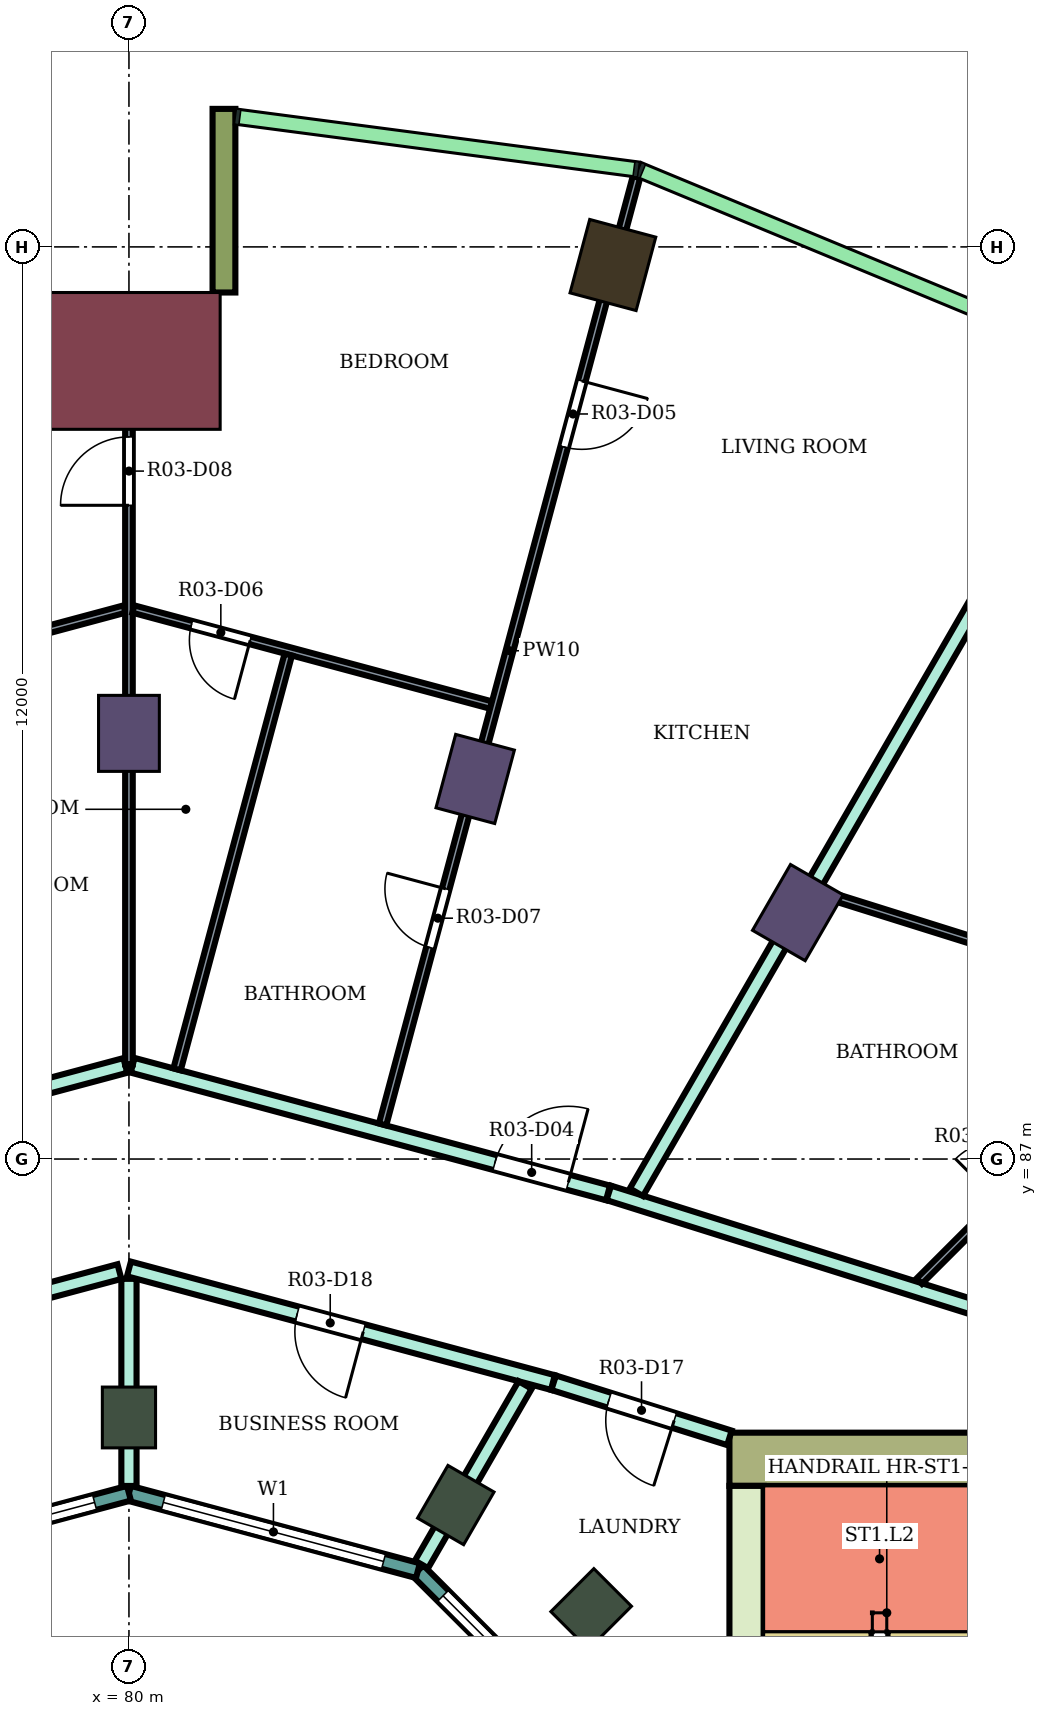
"""IFC4 building model, lengths in metres.
Left out: names, types, materials, properties, quantities, classifications, styles, units other than length and angle.
Written with IfcOpenShell. Run it as: python <this file> out.ifc"""

import sys

from ifc_helpers import new_model, si_unit, direction, frame, frame_2d, origin, origin_2d, place, context, subcontext, project, spatial, rectangle, extrude, element, fill, save


model = new_model("IFC4")
c1 = context("Model", 3, precision=1e-05, world=origin(), true_north=direction((0.0, 1.0)))
c2 = subcontext(c1, "Body", "Model", "MODEL_VIEW")
j1 = project(units=[si_unit("LENGTHUNIT", "METRE"), si_unit("PLANEANGLEUNIT", "RADIAN")], contexts=[c1])
p1 = place(None, origin())
s1 = spatial("IfcSite", under=j1, at=p1, CompositionType="ELEMENT")
p2 = place(p1, origin())
s2 = spatial("IfcBuilding", under=s1, at=p2, CompositionType="ELEMENT")
p3 = place(p2, frame((0.0, 0.0, 186.4)))
s3 = spatial("IfcBuildingStorey", under=s2, at=p3, CompositionType="ELEMENT", Elevation=186.4)
p4 = place(p3, frame((86.367, 98.762, 0.0), z_axis=(0.0, 0.0, 1.0), x_axis=(0.258819045103, 0.965925826289, 0.0)))
e1 = element("IfcColumn", 1, at=p4, inside=s3, PredefinedType="COLUMN", context=c2, shape_type="SweptSolid", body=[
    extrude(rectangle(XDim=1.0, YDim=0.9, at=origin_2d()), origin(), (0.0, 0.0, 1.0), 4.1),
])
for number, where, z_axis, x_axis in (
    (2, (88.8, 90.242, 0.0), (0.0, 0.0, 1.0), (0.5, 0.866, 0.0)),
    (3, (84.555, 92.0, 0.0), (0.0, 0.0, 1.0), (0.259, 0.966, 0.0)),
    (4, (80.0, 92.6, 0.0), (0.0, 0.0, 1.0), (0.0, 1.0, 0.0)),
):
    element("IfcColumn", number, at=place(p3, frame(where, z_axis=z_axis, x_axis=x_axis)), inside=s3, PredefinedType="COLUMN", context=c2, shape_type="SweptSolid", body=[
        extrude(rectangle(XDim=1.0, YDim=0.8, at=origin_2d()), origin(), (0.0, 0.0, 1.0), 4.1),
    ])
for number, where, z_axis, x_axis in (
    (5, (86.081, 81.081, 0.0), (0.0, 0.0, 1.0), (0.707, 0.707, 0.0)),
    (6, (84.3, 82.448, 0.0), (0.0, 0.0, 1.0), (0.5, 0.866, 0.0)),
    (7, (80.0, 83.6, 0.0), (0.0, 0.0, 1.0), (0.0, 1.0, 0.0)),
):
    element("IfcColumn", number, at=place(p3, frame(where, z_axis=z_axis, x_axis=x_axis)), inside=s3, PredefinedType="COLUMN", context=c2, shape_type="SweptSolid", body=[
        extrude(rectangle(XDim=0.8, YDim=0.7, at=origin_2d()), origin(), (0.0, 0.0, 1.0), 4.1),
    ])
p5 = place(p3, frame((80.0, 97.5, 0.0), z_axis=(0.0, 0.0, 1.0), x_axis=(0.0, 1.0, 0.0)))
e8 = element("IfcColumn", 8, at=p5, inside=s3, PredefinedType="COLUMN", context=c2, shape_type="SweptSolid", body=[
    extrude(rectangle(XDim=1.8, YDim=2.4, at=origin_2d()), origin(), (0.0, 0.0, 1.0), 4.1),
])
p6 = place(p3, frame((87.9, 83.05, 0.0), z_axis=(0.0, 0.0, 1.0), x_axis=(1.0, 0.0, 0.0)))
e9 = element("IfcWall", 9, at=p6, inside=s3, PredefinedType="SHEAR", context=c2, shape_type="SweptSolid", body=[
    extrude(rectangle(XDim=14.8, YDim=0.7, at=frame_2d((7.4, 0.0))), origin(), (0.0, 0.0, 1.0), 3.78),
])
p7 = place(p6, frame((4.2, 0.0, 0.0)))
e10 = element("IfcOpeningElement", 10, at=p7, cuts=e9, PredefinedType="OPENING", context=c2, shape_type="SweptSolid", body=[
    extrude(rectangle(XDim=2.4, YDim=2.4, at=frame_2d((1.2, 1.2))), frame((0.0, 0.36, 0.0), z_axis=(0.0, -1.0, 0.0), x_axis=(1.0, 0.0, 0.0)), (0.0, 0.0, 1.0), 0.72),
])
p8 = place(p3, frame((88.125, 75.0, 0.0), z_axis=(0.0, 0.0, 1.0), x_axis=(0.0, 1.0, 0.0)))
e11 = element("IfcWall", 11, at=p8, inside=s3, PredefinedType="SHEAR", context=c2, shape_type="SweptSolid", body=[
    extrude(rectangle(XDim=7.7, YDim=0.45, at=frame_2d((3.85, 0.0))), origin(), (0.0, 0.0, 1.0), 3.78),
])
p9 = place(p3, frame((81.25, 98.4, 0.0), z_axis=(0.0, 0.0, 1.0), x_axis=(0.0, 1.0, 0.0)))
e12 = element("IfcWall", 12, at=p9, inside=s3, PredefinedType="NOTDEFINED", context=c2, shape_type="SweptSolid", body=[
    extrude(rectangle(XDim=2.416, YDim=0.3, at=frame_2d((1.208, 0.0))), origin(), (0.0, 0.0, 1.0), 4.1),
])
p10 = place(p3, frame((86.585, 78.802, 0.0), z_axis=(0.0, 0.0, 1.0), x_axis=(-0.707106781187, 0.707106781187, 0.0)))
e13 = element("IfcWall", 13, at=p10, inside=s3, PredefinedType="NOTDEFINED", context=c2, shape_type="SweptSolid", body=[
    extrude(rectangle(XDim=3.936, YDim=0.2, at=frame_2d((1.968, 0.0))), origin(), (0.0, 0.0, 1.0), 4.1),
])
p11 = place(p10, frame((0.468, 0.0, 0.9)))
e14 = element("IfcOpeningElement", 14, at=p11, cuts=e13, PredefinedType="OPENING", context=c2, shape_type="SweptSolid", body=[
    extrude(rectangle(XDim=3.0, YDim=2.3, at=frame_2d((1.5, 1.15))), frame((0.0, 0.11, 0.0), z_axis=(0.0, -1.0, 0.0), x_axis=(1.0, 0.0, 0.0)), (0.0, 0.0, 1.0), 0.22),
])
p12 = place(p3, frame((83.802, 81.585, 0.0), z_axis=(0.0, 0.0, 1.0), x_axis=(-0.965933654434, 0.258789828301, 0.0)))
e15 = element("IfcWall", 15, at=p12, inside=s3, PredefinedType="NOTDEFINED", context=c2, shape_type="SweptSolid", body=[
    extrude(rectangle(XDim=3.936, YDim=0.2, at=frame_2d((1.968, 0.0))), origin(), (0.0, 0.0, 1.0), 4.1),
])
p13 = place(p12, frame((0.468, 0.0, 0.9)))
e16 = element("IfcOpeningElement", 16, at=p13, cuts=e15, PredefinedType="OPENING", context=c2, shape_type="SweptSolid", body=[
    extrude(rectangle(XDim=3.0, YDim=2.3, at=frame_2d((1.5, 1.15))), frame((0.0, 0.11, 0.0), z_axis=(0.0, -1.0, 0.0), x_axis=(1.0, 0.0, 0.0)), (0.0, 0.0, 1.0), 0.22),
])
p14 = place(p3, frame((80.0, 82.604, 0.0), z_axis=(0.0, 0.0, 1.0), x_axis=(-0.965933654434, -0.258789828301, 0.0)))
e17 = element("IfcWall", 17, at=p14, inside=s3, PredefinedType="NOTDEFINED", context=c2, shape_type="SweptSolid", body=[
    extrude(rectangle(XDim=3.936, YDim=0.2, at=frame_2d((1.968, 0.0))), origin(), (0.0, 0.0, 1.0), 4.1),
])
p15 = place(p14, frame((0.468, 0.0, 0.9)))
e18 = element("IfcOpeningElement", 18, at=p15, cuts=e17, PredefinedType="OPENING", context=c2, shape_type="SweptSolid", body=[
    extrude(rectangle(XDim=3.0, YDim=2.3, at=frame_2d((1.5, 1.15))), frame((0.0, 0.11, 0.0), z_axis=(0.0, -1.0, 0.0), x_axis=(1.0, 0.0, 0.0)), (0.0, 0.0, 1.0), 0.22),
])
p16 = place(p3, frame((73.687, 86.554, 0.0), z_axis=(0.0, 0.0, 1.0), x_axis=(0.965992724769, 0.258569247387, 0.0)))
e19 = element("IfcWall", 19, at=p16, inside=s3, PredefinedType="PARTITIONING", context=c2, shape_type="SweptSolid", body=[
    extrude(rectangle(XDim=6.486, YDim=0.2, at=frame_2d((3.243, 0.0))), origin(), (0.0, 0.0, 1.0), 3.65),
])
p17 = place(p16, frame((0.214, 0.0, 0.0)))
e20 = element("IfcOpeningElement", 20, at=p17, cuts=e19, PredefinedType="OPENING", context=c2, shape_type="SweptSolid", body=[
    extrude(rectangle(XDim=1.0, YDim=2.1, at=frame_2d((0.5, 1.05))), frame((0.0, 0.11, 0.0), z_axis=(0.0, -1.0, 0.0), x_axis=(1.0, 0.0, 0.0)), (0.0, 0.0, 1.0), 0.22),
])
p18 = place(p3, frame((74.413, 84.057, 0.0), z_axis=(0.0, 0.0, 1.0), x_axis=(0.965972135939, 0.258646153246, 0.0)))
e21 = element("IfcWall", 21, at=p18, inside=s3, PredefinedType="PARTITIONING", context=c2, shape_type="SweptSolid", body=[
    extrude(rectangle(XDim=5.654, YDim=0.2, at=frame_2d((2.827, 0.0))), origin(), (0.0, 0.0, 1.0), 3.65),
])
p19 = place(p18, frame((2.593, 0.0, 0.0)))
e22 = element("IfcOpeningElement", 22, at=p19, cuts=e21, PredefinedType="OPENING", context=c2, shape_type="SweptSolid", body=[
    extrude(rectangle(XDim=0.9, YDim=2.1, at=frame_2d((0.45, 1.05))), frame((0.0, 0.11, 0.0), z_axis=(0.0, -1.0, 0.0), x_axis=(1.0, 0.0, 0.0)), (0.0, 0.0, 1.0), 0.22),
])
p20 = place(p3, frame((80.0, 82.699, 0.0), z_axis=(0.0, 0.0, 1.0), x_axis=(0.0, 1.0, 0.0)))
e23 = element("IfcWall", 23, at=p20, inside=s3, PredefinedType="PARTITIONING", context=c2, shape_type="SweptSolid", body=[
    extrude(rectangle(XDim=2.725, YDim=0.2, at=frame_2d((1.363, 0.0))), origin(), (0.0, 0.0, 1.0), 3.65),
])
p21 = place(p3, frame((80.0, 85.554, 0.0), z_axis=(0.0, 0.0, 1.0), x_axis=(0.965928989968, -0.258807237802, 0.0)))
e24 = element("IfcWall", 24, at=p21, inside=s3, PredefinedType="PARTITIONING", context=c2, shape_type="SweptSolid", body=[
    extrude(rectangle(XDim=5.774, YDim=0.2, at=frame_2d((2.887, 0.0))), origin(), (0.0, 0.0, 1.0), 3.65),
])
p22 = place(p21, frame((2.292, 0.0, 0.0)))
e25 = element("IfcOpeningElement", 25, at=p22, cuts=e24, PredefinedType="OPENING", context=c2, shape_type="SweptSolid", body=[
    extrude(rectangle(XDim=0.9, YDim=2.1, at=frame_2d((0.45, 1.05))), frame((0.0, 0.11, 0.0), z_axis=(0.0, -1.0, 0.0), x_axis=(1.0, 0.0, 0.0)), (0.0, 0.0, 1.0), 0.22),
])
p23 = place(p3, frame((80.048, 88.233, 0.0), z_axis=(0.0, 0.0, 1.0), x_axis=(0.965787353661, -0.259335280109, 0.0)))
e26 = element("IfcWall", 26, at=p23, inside=s3, PredefinedType="PARTITIONING", context=c2, shape_type="SweptSolid", body=[
    extrude(rectangle(XDim=6.476, YDim=0.2, at=frame_2d((3.238, 0.0))), origin(), (0.0, 0.0, 1.0), 3.65),
])
p24 = place(p23, frame((4.936, 0.0, 0.0)))
e27 = element("IfcOpeningElement", 27, at=p24, cuts=e26, PredefinedType="OPENING", context=c2, shape_type="SweptSolid", body=[
    extrude(rectangle(XDim=1.0, YDim=2.1, at=frame_2d((0.5, 1.05))), frame((0.0, 0.11, 0.0), z_axis=(0.0, -1.0, 0.0), x_axis=(1.0, 0.0, 0.0)), (0.0, 0.0, 1.0), 0.22),
])
p25 = place(p3, frame((83.849, 81.667, 0.0), z_axis=(0.0, 0.0, 1.0), x_axis=(0.500117899823, 0.865957323588, 0.0)))
e28 = element("IfcWall", 28, at=p25, inside=s3, PredefinedType="PARTITIONING", context=c2, shape_type="SweptSolid", body=[
    extrude(rectangle(XDim=2.725, YDim=0.2, at=frame_2d((1.363, 0.0))), origin(), (0.0, 0.0, 1.0), 3.65),
])
p26 = place(p3, frame((85.587, 84.057, 0.0), z_axis=(0.0, 0.0, 1.0), x_axis=(0.954239513179, -0.299043393987, 0.0)))
e29 = element("IfcWall", 29, at=p26, inside=s3, PredefinedType="PARTITIONING", context=c2, shape_type="SweptSolid", body=[
    extrude(rectangle(XDim=2.424, YDim=0.2, at=frame_2d((1.212, 0.0))), origin(), (0.0, 0.0, 1.0), 3.65),
])
p27 = place(p26, frame((0.762, 0.0, 0.0)))
e30 = element("IfcOpeningElement", 30, at=p27, cuts=e29, PredefinedType="OPENING", context=c2, shape_type="SweptSolid", body=[
    extrude(rectangle(XDim=0.9, YDim=2.1, at=frame_2d((0.45, 1.05))), frame((0.0, 0.11, 0.0), z_axis=(0.0, -1.0, 0.0), x_axis=(1.0, 0.0, 0.0)), (0.0, 0.0, 1.0), 0.22),
])
p28 = place(p3, frame((86.313, 86.554, 0.0), z_axis=(0.0, 0.0, 1.0), x_axis=(0.954081217458, -0.299548043717, 0.0)))
e31 = element("IfcWall", 31, at=p28, inside=s3, PredefinedType="PARTITIONING", context=c2, shape_type="SweptSolid", body=[
    extrude(rectangle(XDim=5.721, YDim=0.2, at=frame_2d((2.86, 0.0))), origin(), (0.0, 0.0, 1.0), 3.65),
])
p29 = place(p3, frame((86.676, 86.563, 0.0), z_axis=(0.0, 0.0, 1.0), x_axis=(0.500130524836, 0.865950032119, 0.0)))
e32 = element("IfcWall", 32, at=p29, inside=s3, PredefinedType="PARTITIONING", context=c2, shape_type="SweptSolid", body=[
    extrude(rectangle(XDim=12.446, YDim=0.2, at=frame_2d((6.223, 0.0))), origin(), (0.0, 0.0, 1.0), 3.65),
])
p30 = place(p3, frame((75.295, 92.989, 0.0), z_axis=(0.0, 0.0, 1.0), x_axis=(0.965829517501, 0.259178207271, 0.0)))
e33 = element("IfcWall", 33, at=p30, inside=s3, PredefinedType="PARTITIONING", context=c2, shape_type="SweptSolid", body=[
    extrude(rectangle(XDim=4.812, YDim=0.1, at=frame_2d((2.406, 0.0))), origin(), (0.0, 0.0, 1.0), 3.65),
])
p31 = place(p30, frame((1.981, 0.0, 0.0)))
e34 = element("IfcOpeningElement", 34, at=p31, cuts=e33, PredefinedType="OPENING", context=c2, shape_type="SweptSolid", body=[
    extrude(rectangle(XDim=0.8, YDim=2.1, at=frame_2d((0.4, 1.05))), frame((0.0, 0.06, 0.0), z_axis=(0.0, -1.0, 0.0), x_axis=(1.0, 0.0, 0.0)), (0.0, 0.0, 1.0), 0.12),
])
p32 = place(p3, frame((80.0, 88.246, 0.0), z_axis=(0.0, 0.0, 1.0), x_axis=(0.0, 1.0, 0.0)))
e35 = element("IfcWall", 35, at=p32, inside=s3, PredefinedType="PARTITIONING", context=c2, shape_type="SweptSolid", body=[
    extrude(rectangle(XDim=9.954, YDim=0.1, at=frame_2d((4.977, 0.0))), origin(), (0.0, 0.0, 1.0), 3.65),
])
p33 = place(p32, frame((7.354, 0.0, 0.0)))
e36 = element("IfcOpeningElement", 36, at=p33, cuts=e35, PredefinedType="OPENING", context=c2, shape_type="SweptSolid", body=[
    extrude(rectangle(XDim=0.9, YDim=2.1, at=frame_2d((0.45, 1.05))), frame((0.0, 0.06, 0.0), z_axis=(0.0, -1.0, 0.0), x_axis=(1.0, 0.0, 0.0)), (0.0, 0.0, 1.0), 0.12),
])
p34 = place(p3, frame((80.058, 94.235, 0.0), z_axis=(0.0, 0.0, 1.0), x_axis=(0.965831212389, -0.259171891173, 0.0)))
e37 = element("IfcWall", 37, at=p34, inside=s3, PredefinedType="PARTITIONING", context=c2, shape_type="SweptSolid", body=[
    extrude(rectangle(XDim=4.872, YDim=0.1, at=frame_2d((2.436, 0.0))), origin(), (0.0, 0.0, 1.0), 3.65),
])
p35 = place(p34, frame((0.792, 0.0, 0.0)))
e38 = element("IfcOpeningElement", 38, at=p35, cuts=e37, PredefinedType="OPENING", context=c2, shape_type="SweptSolid", body=[
    extrude(rectangle(XDim=0.8, YDim=2.1, at=frame_2d((0.4, 1.05))), frame((0.0, 0.06, 0.0), z_axis=(0.0, -1.0, 0.0), x_axis=(1.0, 0.0, 0.0)), (0.0, 0.0, 1.0), 0.12),
])
p36 = place(p3, frame((80.633, 88.18, 0.0), z_axis=(0.0, 0.0, 1.0), x_axis=(0.25898304477, 0.965881867788, 0.0)))
e39 = element("IfcWall", 39, at=p36, inside=s3, PredefinedType="PARTITIONING", context=c2, shape_type="SweptSolid", body=[
    extrude(rectangle(XDim=5.65, YDim=0.1, at=frame_2d((2.825, 0.0))), origin(), (0.0, 0.0, 1.0), 3.65),
])
p37 = place(p3, frame((83.337, 87.455, 0.0), z_axis=(0.0, 0.0, 1.0), x_axis=(0.258861232071, 0.965914521337, 0.0)))
e40 = element("IfcWall", 40, at=p37, inside=s3, PredefinedType="PARTITIONING", context=c2, shape_type="SweptSolid", body=[
    extrude(rectangle(XDim=12.904, YDim=0.1, at=frame_2d((6.452, 0.0))), origin(), (0.0, 0.0, 1.0), 3.65),
])
p38 = place(p37, frame((9.227, 0.0, 0.0)))
e41 = element("IfcOpeningElement", 41, at=p38, cuts=e40, PredefinedType="OPENING", context=c2, shape_type="SweptSolid", body=[
    extrude(rectangle(XDim=0.9, YDim=2.1, at=frame_2d((0.45, 1.05))), frame((0.0, 0.06, 0.0), z_axis=(0.0, -1.0, 0.0), x_axis=(1.0, 0.0, 0.0)), (0.0, 0.0, 1.0), 0.12),
])
p39 = place(p37, frame((2.409, 0.0, 0.0)))
e42 = element("IfcOpeningElement", 42, at=p39, cuts=e40, PredefinedType="OPENING", context=c2, shape_type="SweptSolid", body=[
    extrude(rectangle(XDim=0.8, YDim=2.1, at=frame_2d((0.4, 1.05))), frame((0.0, 0.06, 0.0), z_axis=(0.0, -1.0, 0.0), x_axis=(1.0, 0.0, 0.0)), (0.0, 0.0, 1.0), 0.12),
])
p40 = place(p3, frame((89.078, 90.508, 0.0), z_axis=(0.0, 0.0, 1.0), x_axis=(0.954199699612, -0.299170408398, 0.0)))
e43 = element("IfcWall", 43, at=p40, inside=s3, PredefinedType="PARTITIONING", context=c2, shape_type="SweptSolid", body=[
    extrude(rectangle(XDim=5.06, YDim=0.1, at=frame_2d((2.53, 0.0))), origin(), (0.0, 0.0, 1.0), 3.65),
])
p41 = place(p3, frame((90.397, 85.393, 0.0), z_axis=(0.0, 0.0, 1.0), x_axis=(0.707264750546, 0.706948776529, 0.0)))
e44 = element("IfcWall", 44, at=p41, inside=s3, PredefinedType="PARTITIONING", context=c2, shape_type="SweptSolid", body=[
    extrude(rectangle(XDim=8.499, YDim=0.1, at=frame_2d((4.25, 0.0))), origin(), (0.0, 0.0, 1.0), 3.65),
])
p42 = place(p41, frame((5.857, 0.0, 0.0)))
e45 = element("IfcOpeningElement", 45, at=p42, cuts=e44, PredefinedType="OPENING", context=c2, shape_type="SweptSolid", body=[
    extrude(rectangle(XDim=0.9, YDim=2.1, at=frame_2d((0.45, 1.05))), frame((0.0, 0.06, 0.0), z_axis=(0.0, -1.0, 0.0), x_axis=(1.0, 0.0, 0.0)), (0.0, 0.0, 1.0), 0.12),
])
p43 = place(p41, frame((1.476, 0.0, 0.0)))
e46 = element("IfcOpeningElement", 46, at=p43, cuts=e44, PredefinedType="OPENING", context=c2, shape_type="SweptSolid", body=[
    extrude(rectangle(XDim=0.8, YDim=2.1, at=frame_2d((0.4, 1.05))), frame((0.0, 0.06, 0.0), z_axis=(0.0, -1.0, 0.0), x_axis=(1.0, 0.0, 0.0)), (0.0, 0.0, 1.0), 0.12),
])
p44 = place(p11, origin())
e47 = element("IfcWindow", 47, at=p44, inside=s3, PartitioningType="SINGLE_PANEL", PredefinedType="WINDOW", context=c2, shape_type="SweptSolid", body=[
    extrude(rectangle(XDim=3.0, YDim=2.3, at=frame_2d((1.5, 1.15))), frame((0.0, 0.03, 0.0), z_axis=(0.0, -1.0, 0.0), x_axis=(1.0, 0.0, 0.0)), (0.0, 0.0, 1.0), 0.06),
])
fill(e14, e47)
p45 = place(p13, origin())
e48 = element("IfcWindow", 48, at=p45, inside=s3, PartitioningType="SINGLE_PANEL", PredefinedType="WINDOW", context=c2, shape_type="SweptSolid", body=[
    extrude(rectangle(XDim=3.0, YDim=2.3, at=frame_2d((1.5, 1.15))), frame((0.0, 0.03, 0.0), z_axis=(0.0, -1.0, 0.0), x_axis=(1.0, 0.0, 0.0)), (0.0, 0.0, 1.0), 0.06),
])
fill(e16, e48)
p46 = place(p15, origin())
e49 = element("IfcWindow", 49, at=p46, inside=s3, PartitioningType="SINGLE_PANEL", PredefinedType="WINDOW", context=c2, shape_type="SweptSolid", body=[
    extrude(rectangle(XDim=3.0, YDim=2.3, at=frame_2d((1.5, 1.15))), frame((0.0, 0.03, 0.0), z_axis=(0.0, -1.0, 0.0), x_axis=(1.0, 0.0, 0.0)), (0.0, 0.0, 1.0), 0.06),
])
fill(e18, e49)
p47 = place(p24, origin())
e50 = element("IfcDoor", 50, at=p47, inside=s3, OperationType="SINGLE_SWING_RIGHT", PredefinedType="DOOR", context=c2, shape_type="SweptSolid", body=[
    extrude(rectangle(XDim=1.0, YDim=2.1, at=frame_2d((0.5, 1.05))), frame((0.0, 0.025, 0.0), z_axis=(0.0, -1.0, 0.0), x_axis=(1.0, 0.0, 0.0)), (0.0, 0.0, 1.0), 0.05),
])
fill(e27, e50)
p48 = place(p38, frame((0.9, 0.0, 0.0), z_axis=(0.0, 0.0, 1.0), x_axis=(-1.0, 0.0, 0.0)))
e51 = element("IfcDoor", 51, at=p48, inside=s3, OperationType="SINGLE_SWING_LEFT", PredefinedType="DOOR", context=c2, shape_type="SweptSolid", body=[
    extrude(rectangle(XDim=0.9, YDim=2.1, at=frame_2d((0.45, 1.05))), frame((0.0, 0.025, 0.0), z_axis=(0.0, -1.0, 0.0), x_axis=(1.0, 0.0, 0.0)), (0.0, 0.0, 1.0), 0.05),
])
fill(e41, e51)
p49 = place(p35, frame((0.8, 0.0, 0.0), z_axis=(0.0, 0.0, 1.0), x_axis=(-1.0, 0.0, 0.0)))
e52 = element("IfcDoor", 52, at=p49, inside=s3, OperationType="SINGLE_SWING_LEFT", PredefinedType="DOOR", context=c2, shape_type="SweptSolid", body=[
    extrude(rectangle(XDim=0.8, YDim=2.1, at=frame_2d((0.4, 1.05))), frame((0.0, 0.025, 0.0), z_axis=(0.0, -1.0, 0.0), x_axis=(1.0, 0.0, 0.0)), (0.0, 0.0, 1.0), 0.05),
])
fill(e38, e52)
p50 = place(p39, origin())
e53 = element("IfcDoor", 53, at=p50, inside=s3, OperationType="SINGLE_SWING_RIGHT", PredefinedType="DOOR", context=c2, shape_type="SweptSolid", body=[
    extrude(rectangle(XDim=0.8, YDim=2.1, at=frame_2d((0.4, 1.05))), frame((0.0, 0.025, 0.0), z_axis=(0.0, -1.0, 0.0), x_axis=(1.0, 0.0, 0.0)), (0.0, 0.0, 1.0), 0.05),
])
fill(e42, e53)
p51 = place(p33, origin())
e54 = element("IfcDoor", 54, at=p51, inside=s3, OperationType="SINGLE_SWING_LEFT", PredefinedType="DOOR", context=c2, shape_type="SweptSolid", body=[
    extrude(rectangle(XDim=0.9, YDim=2.1, at=frame_2d((0.45, 1.05))), frame((0.0, 0.025, 0.0), z_axis=(0.0, -1.0, 0.0), x_axis=(1.0, 0.0, 0.0)), (0.0, 0.0, 1.0), 0.05),
])
fill(e36, e54)
p52 = place(p27, frame((0.9, 0.0, 0.0), z_axis=(0.0, 0.0, 1.0), x_axis=(-1.0, 0.0, 0.0)))
e55 = element("IfcDoor", 55, at=p52, inside=s3, OperationType="SINGLE_SWING_LEFT", PredefinedType="DOOR", context=c2, shape_type="SweptSolid", body=[
    extrude(rectangle(XDim=0.9, YDim=2.1, at=frame_2d((0.45, 1.05))), frame((0.0, 0.025, 0.0), z_axis=(0.0, -1.0, 0.0), x_axis=(1.0, 0.0, 0.0)), (0.0, 0.0, 1.0), 0.05),
])
fill(e30, e55)
p53 = place(p22, frame((0.9, 0.0, 0.0), z_axis=(0.0, 0.0, 1.0), x_axis=(-1.0, 0.0, 0.0)))
e56 = element("IfcDoor", 56, at=p53, inside=s3, OperationType="SINGLE_SWING_LEFT", PredefinedType="DOOR", context=c2, shape_type="SweptSolid", body=[
    extrude(rectangle(XDim=0.9, YDim=2.1, at=frame_2d((0.45, 1.05))), frame((0.0, 0.025, 0.0), z_axis=(0.0, -1.0, 0.0), x_axis=(1.0, 0.0, 0.0)), (0.0, 0.0, 1.0), 0.05),
])
fill(e25, e56)
save(model, sys.argv[1])
